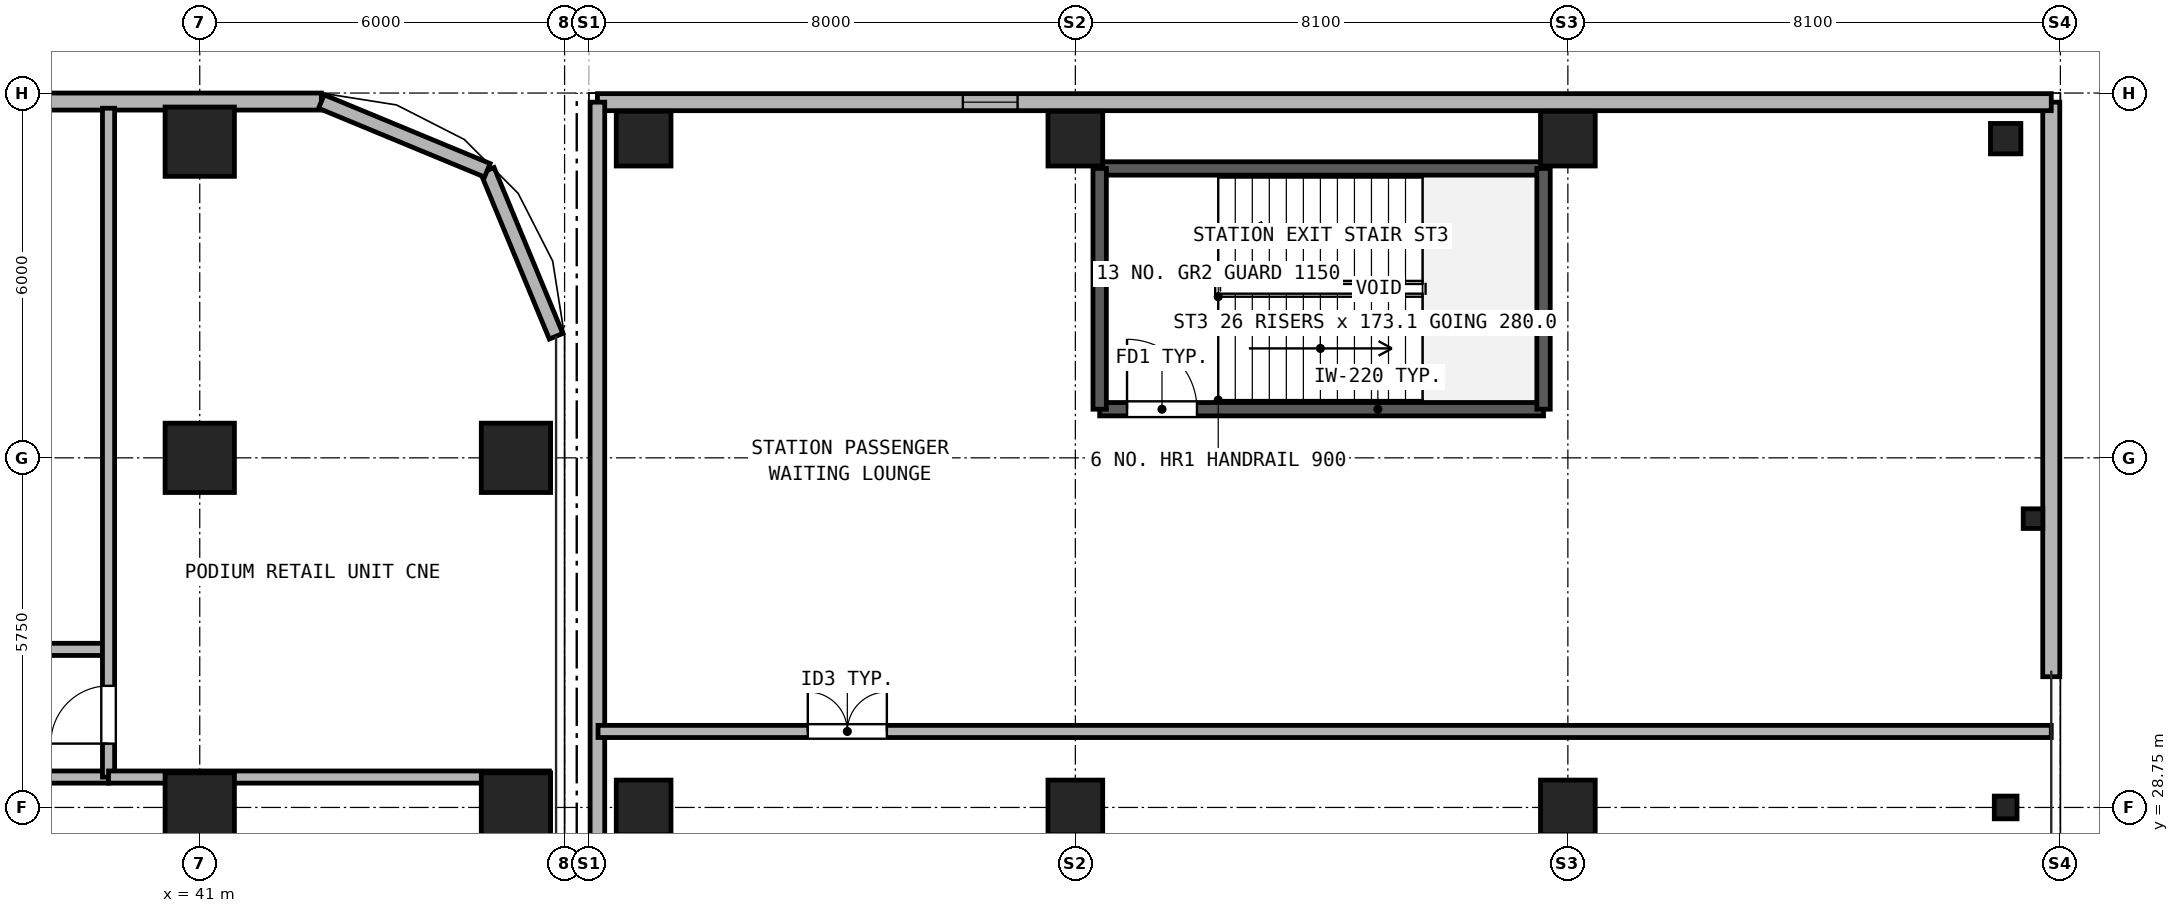
"""IFC4 building model, lengths in metres.
Left out: names, types, materials, properties, quantities, classifications, styles, units other than length and angle.
Written with IfcOpenShell. Run it as: python <this file> out.ifc"""

import sys

from ifc_helpers import new_model, si_unit, direction, frame, frame_2d, origin, origin_2d, place, context, subcontext, project, spatial, rectangle, hollow_rectangle, i_section, extrude, source, transform, mapped, element, fill, save


model = new_model("IFC4")
c1 = context("Model", 3, precision=1e-05, world=origin(), true_north=direction((0.0, 1.0)))
c2 = subcontext(c1, "Body", "Model", "MODEL_VIEW")
j1 = project(units=[si_unit("LENGTHUNIT", "METRE"), si_unit("PLANEANGLEUNIT", "RADIAN")], contexts=[c1])
p1 = place(None, origin())
s1 = spatial("IfcSite", under=j1, at=p1, CompositionType="ELEMENT")
p2 = place(p1, origin())
s2 = spatial("IfcBuilding", under=s1, at=p2, CompositionType="ELEMENT")
p3 = place(p2, frame((0.0, 0.0, 9.0)))
s3 = spatial("IfcBuildingStorey", under=s2, at=p3, CompositionType="ELEMENT", Elevation=9.0)
m1 = source(origin(), c2, "Body", "SweptSolid", [
    extrude(hollow_rectangle(XDim=1.14, YDim=1.14, WallThickness=0.07, at=origin_2d()), origin(), (0.0, 0.0, 1.0), 4.18),
])
for number, where, z_axis, x_axis in (
    (1, (41.0, 39.7, 0.0), (0.0, 0.0, 1.0), (1.0, 0.0, 0.0)),
    (2, (46.2, 28.75, 0.0), (0.0, 0.0, 1.0), (1.0, 0.0, 0.0)),
    (3, (46.2, 34.5, 0.0), (0.0, 0.0, 1.0), (1.0, 0.0, 0.0)),
    (4, (41.0, 28.75, 0.0), (0.0, 0.0, 1.0), (1.0, 0.0, 0.0)),
    (5, (41.0, 34.5, 0.0), (0.0, 0.0, 1.0), (1.0, 0.0, 0.0)),
):
    element("IfcColumn", number, at=place(p3, frame(where, z_axis=z_axis, x_axis=x_axis)), inside=s3, PredefinedType="COLUMN", context=c2, shape_type="MappedRepresentation", body=[
        mapped(m1, transform((0.0, 0.0, 0.0), x_axis=(1.0, 0.0, 0.0), y_axis=(0.0, 1.0, 0.0), z_axis=(0.0, 0.0, 1.0), scale=1.0)),
    ])
m2 = source(origin(), c2, "Body", "SweptSolid", [
    extrude(hollow_rectangle(XDim=0.7, YDim=0.9, WallThickness=0.04, at=origin_2d()), origin(), (0.0, 0.0, 1.0), 4.18),
])
for number, where, z_axis, x_axis in (
    (6, (48.3, 28.75, 0.0), (0.0, 0.0, 1.0), (1.0, 0.0, 0.0)),
    (7, (48.3, 39.75, 0.0), (0.0, 0.0, 1.0), (1.0, 0.0, 0.0)),
    (8, (55.4, 28.75, 0.0), (0.0, 0.0, 1.0), (1.0, 0.0, 0.0)),
    (9, (55.4, 39.75, 0.0), (0.0, 0.0, 1.0), (1.0, 0.0, 0.0)),
    (10, (63.5, 28.75, 0.0), (0.0, 0.0, 1.0), (1.0, 0.0, 0.0)),
    (11, (63.5, 39.75, 0.0), (0.0, 0.0, 1.0), (1.0, 0.0, 0.0)),
):
    element("IfcColumn", number, at=place(p3, frame(where, z_axis=z_axis, x_axis=x_axis)), inside=s3, PredefinedType="COLUMN", context=c2, shape_type="MappedRepresentation", body=[
        mapped(m2, transform((0.0, 0.0, 0.0), x_axis=(1.0, 0.0, 0.0), y_axis=(0.0, 1.0, 0.0), z_axis=(0.0, 0.0, 1.0), scale=1.0)),
    ])
m3 = source(origin(), c2, "Body", "SweptSolid", [
    extrude(i_section(OverallWidth=0.374, OverallDepth=0.372, WebThickness=0.016, FlangeThickness=0.026, at=origin_2d()), origin(), (0.0, 0.0, 1.0), 4.18),
])
p4 = place(p3, frame((70.7, 28.75, 0.0), z_axis=(0.0, 0.0, 1.0), x_axis=(1.0, 0.0, 0.0)))
e12 = element("IfcColumn", 12, at=p4, inside=s3, PredefinedType="COLUMN", context=c2, shape_type="MappedRepresentation", body=[
    mapped(m3, transform((0.0, 0.0, 0.0), x_axis=(1.0, 0.0, 0.0), y_axis=(0.0, 1.0, 0.0), z_axis=(0.0, 0.0, 1.0), scale=1.0)),
])
m4 = source(origin(), c2, "Body", "SweptSolid", [
    extrude(hollow_rectangle(XDim=0.5, YDim=0.5, WallThickness=0.025, at=origin_2d()), origin(), (0.0, 0.0, 1.0), 4.18),
])
p5 = place(p3, frame((70.7, 39.75, 0.0), z_axis=(0.0, 0.0, 1.0), x_axis=(1.0, 0.0, 0.0)))
e13 = element("IfcColumn", 13, at=p5, inside=s3, PredefinedType="COLUMN", context=c2, shape_type="MappedRepresentation", body=[
    mapped(m4, transform((0.0, 0.0, 0.0), x_axis=(1.0, 0.0, 0.0), y_axis=(0.0, 1.0, 0.0), z_axis=(0.0, 0.0, 1.0), scale=1.0)),
])
m5 = source(origin(), c2, "Body", "SweptSolid", [
    extrude(i_section(OverallWidth=0.309, OverallDepth=0.323, WebThickness=0.014, FlangeThickness=0.023, at=origin_2d()), origin(), (0.0, 0.0, 1.0), 4.18),
])
p6 = place(p3, frame((71.15, 33.5, 0.0), z_axis=(0.0, 0.0, 1.0), x_axis=(1.0, 0.0, 0.0)))
e14 = element("IfcColumn", 14, at=p6, inside=s3, PredefinedType="PILASTER", context=c2, shape_type="MappedRepresentation", body=[
    mapped(m5, transform((0.0, 0.0, 0.0), x_axis=(1.0, 0.0, 0.0), y_axis=(0.0, 1.0, 0.0), z_axis=(0.0, 0.0, 1.0), scale=1.0)),
])
p7 = place(p3, frame((4.0, 40.36, 0.0), z_axis=(0.0, 0.0, 1.0), x_axis=(1.0, 0.0, 0.0)))
e15 = element("IfcWall", 15, at=p7, inside=s3, PredefinedType="SOLIDWALL", context=c2, shape_type="SweptSolid", body=[
    extrude(rectangle(XDim=39.0, YDim=0.28, at=frame_2d((19.5, 0.0))), origin(), (0.0, 0.0, 1.0), 4.18),
])
p8 = place(p7, frame((4.0, 0.0, 0.9)))
e16 = element("IfcOpeningElement", 16, at=p8, cuts=e15, PredefinedType="OPENING", context=c2, shape_type="SweptSolid", body=[
    extrude(rectangle(XDim=1.5, YDim=1.8, at=frame_2d((0.75, 0.9))), frame((0.0, 0.15, 0.0), z_axis=(0.0, -1.0, 0.0), x_axis=(1.0, 0.0, 0.0)), (0.0, 0.0, 1.0), 0.3),
])
p9 = place(p7, frame((11.2, 0.0, 0.9)))
e17 = element("IfcOpeningElement", 17, at=p9, cuts=e15, PredefinedType="OPENING", context=c2, shape_type="SweptSolid", body=[
    extrude(rectangle(XDim=1.5, YDim=1.8, at=frame_2d((0.75, 0.9))), frame((0.0, 0.15, 0.0), z_axis=(0.0, -1.0, 0.0), x_axis=(1.0, 0.0, 0.0)), (0.0, 0.0, 1.0), 0.3),
])
p10 = place(p7, frame((19.5, 0.0, 0.9)))
e18 = element("IfcOpeningElement", 18, at=p10, cuts=e15, PredefinedType="OPENING", context=c2, shape_type="SweptSolid", body=[
    extrude(rectangle(XDim=1.5, YDim=1.8, at=frame_2d((0.75, 0.9))), frame((0.0, 0.15, 0.0), z_axis=(0.0, -1.0, 0.0), x_axis=(1.0, 0.0, 0.0)), (0.0, 0.0, 1.0), 0.3),
])
p11 = place(p7, frame((26.2, 0.0, 0.9)))
e19 = element("IfcOpeningElement", 19, at=p11, cuts=e15, PredefinedType="OPENING", context=c2, shape_type="SweptSolid", body=[
    extrude(rectangle(XDim=1.5, YDim=1.8, at=frame_2d((0.75, 0.9))), frame((0.0, 0.15, 0.0), z_axis=(0.0, -1.0, 0.0), x_axis=(1.0, 0.0, 0.0)), (0.0, 0.0, 1.0), 0.3),
])
p12 = place(p7, frame((32.8, 0.0, 0.9)))
e20 = element("IfcOpeningElement", 20, at=p12, cuts=e15, PredefinedType="OPENING", context=c2, shape_type="SweptSolid", body=[
    extrude(rectangle(XDim=1.5, YDim=1.8, at=frame_2d((0.75, 0.9))), frame((0.0, 0.15, 0.0), z_axis=(0.0, -1.0, 0.0), x_axis=(1.0, 0.0, 0.0)), (0.0, 0.0, 1.0), 0.3),
])
for number, where, z_axis, x_axis in (
    (21, (46.86, 36.5, 0.0), (0.0, 0.0, 1.0), (-0.383, 0.924, 0.0)),
    (22, (45.729, 39.229, 0.0), (0.0, 0.0, 1.0), (-0.924, 0.383, 0.0)),
):
    element("IfcWall", number, at=place(p3, frame(where, z_axis=z_axis, x_axis=x_axis)), inside=s3, PredefinedType="SOLIDWALL", context=c2, shape_type="SweptSolid", body=[
        extrude(rectangle(XDim=2.954, YDim=0.24, at=frame_2d((1.477, 0.0))), origin(), (0.0, 0.0, 1.0), 4.18),
    ])
p13 = place(p3, frame((71.45, 30.9, 0.0), z_axis=(0.0, 0.0, 1.0), x_axis=(0.0, 1.0, 0.0)))
e23 = element("IfcWall", 23, at=p13, inside=s3, PredefinedType="SOLIDWALL", context=c2, shape_type="SweptSolid", body=[
    extrude(rectangle(XDim=9.45, YDim=0.28, at=frame_2d((4.725, 0.0))), origin(), (0.0, 0.0, 1.0), 4.18),
])
p14 = place(p3, frame((47.54, 40.35, 0.0), z_axis=(0.0, 0.0, 1.0), x_axis=(1.0, 0.0, 0.0)))
e24 = element("IfcWall", 24, at=p14, inside=s3, PredefinedType="SOLIDWALL", context=c2, shape_type="SweptSolid", body=[
    extrude(rectangle(XDim=23.91, YDim=0.28, at=frame_2d((11.955, 0.0))), origin(), (0.0, 0.0, 1.0), 4.18),
])
p15 = place(p14, frame((6.01, 0.0, 1.1)))
e25 = element("IfcOpeningElement", 25, at=p15, cuts=e24, PredefinedType="OPENING", context=c2, shape_type="SweptSolid", body=[
    extrude(rectangle(XDim=0.9, YDim=1.5, at=frame_2d((0.45, 0.75))), frame((0.0, 0.15, 0.0), z_axis=(0.0, -1.0, 0.0), x_axis=(1.0, 0.0, 0.0)), (0.0, 0.0, 1.0), 0.3),
])
p16 = place(p3, frame((47.54, -0.54, 0.0), z_axis=(0.0, 0.0, 1.0), x_axis=(0.0, 1.0, 0.0)))
e26 = element("IfcWall", 26, at=p16, inside=s3, PredefinedType="SOLIDWALL", context=c2, shape_type="SweptSolid", body=[
    extrude(rectangle(XDim=40.89, YDim=0.24, at=frame_2d((20.445, 0.0))), origin(), (0.0, 0.0, 1.0), 4.18),
])
p17 = place(p3, frame((7.5, 31.35, 0.0), z_axis=(0.0, 0.0, 1.0), x_axis=(1.0, 0.0, 0.0)))
e27 = element("IfcWall", 27, at=p17, inside=s3, PredefinedType="PARTITIONING", context=c2, shape_type="SweptSolid", body=[
    extrude(rectangle(XDim=32.0, YDim=0.2, at=frame_2d((16.0, 0.0))), origin(), (0.0, 0.0, 1.0), 4.18),
])
p18 = place(p17, frame((8.5, 0.0, 0.0)))
e28 = element("IfcOpeningElement", 28, at=p18, cuts=e27, PredefinedType="OPENING", context=c2, shape_type="SweptSolid", body=[
    extrude(rectangle(XDim=0.95, YDim=2.15, at=frame_2d((0.475, 1.075))), frame((0.0, 0.11, 0.0), z_axis=(0.0, -1.0, 0.0), x_axis=(1.0, 0.0, 0.0)), (0.0, 0.0, 1.0), 0.22),
])
p19 = place(p17, frame((24.5, 0.0, 0.0)))
e29 = element("IfcOpeningElement", 29, at=p19, cuts=e27, PredefinedType="OPENING", context=c2, shape_type="SweptSolid", body=[
    extrude(rectangle(XDim=0.95, YDim=2.15, at=frame_2d((0.475, 1.075))), frame((0.0, 0.11, 0.0), z_axis=(0.0, -1.0, 0.0), x_axis=(1.0, 0.0, 0.0)), (0.0, 0.0, 1.0), 0.22),
])
p20 = place(p3, frame((30.7, 29.25, 0.0), z_axis=(0.0, 0.0, 1.0), x_axis=(1.0, 0.0, 0.0)))
e30 = element("IfcWall", 30, at=p20, inside=s3, PredefinedType="PARTITIONING", context=c2, shape_type="SweptSolid", body=[
    extrude(rectangle(XDim=8.8, YDim=0.2, at=frame_2d((4.4, 0.0))), origin(), (0.0, 0.0, 1.0), 4.18),
])
p21 = place(p3, frame((39.5, 29.25, 0.0), z_axis=(0.0, 0.0, 1.0), x_axis=(0.0, 1.0, 0.0)))
e31 = element("IfcWall", 31, at=p21, inside=s3, PredefinedType="PARTITIONING", context=c2, shape_type="SweptSolid", body=[
    extrude(rectangle(XDim=11.0, YDim=0.2, at=frame_2d((5.5, 0.0))), origin(), (0.0, 0.0, 1.0), 4.18),
])
p22 = place(p21, frame((0.55, 0.0, 0.0)))
e32 = element("IfcOpeningElement", 32, at=p22, cuts=e31, PredefinedType="OPENING", context=c2, shape_type="SweptSolid", body=[
    extrude(rectangle(XDim=0.95, YDim=2.15, at=frame_2d((0.475, 1.075))), frame((0.0, 0.11, 0.0), z_axis=(0.0, -1.0, 0.0), x_axis=(1.0, 0.0, 0.0)), (0.0, 0.0, 1.0), 0.22),
])
p23 = place(p3, frame((39.5, 29.25, 0.0), z_axis=(0.0, 0.0, 1.0), x_axis=(1.0, 0.0, 0.0)))
e33 = element("IfcWall", 33, at=p23, inside=s3, PredefinedType="PARTITIONING", context=c2, shape_type="SweptSolid", body=[
    extrude(rectangle(XDim=7.25, YDim=0.2, at=frame_2d((3.625, 0.0))), origin(), (0.0, 0.0, 1.0), 4.18),
])
p24 = place(p3, frame((55.8, 35.3, 0.0), z_axis=(0.0, 0.0, 1.0), x_axis=(1.0, 0.0, 0.0)))
e34 = element("IfcWall", 34, at=p24, inside=s3, PredefinedType="SOLIDWALL", context=c2, shape_type="SweptSolid", body=[
    extrude(rectangle(XDim=7.3, YDim=0.22, at=frame_2d((3.65, 0.0))), origin(), (0.0, 0.0, 1.0), 4.18),
])
p25 = place(p24, frame((0.45, 0.0, 0.0)))
e35 = element("IfcOpeningElement", 35, at=p25, cuts=e34, PredefinedType="OPENING", context=c2, shape_type="SweptSolid", body=[
    extrude(rectangle(XDim=1.15, YDim=2.2, at=frame_2d((0.575, 1.1))), frame((0.0, 0.12, 0.0), z_axis=(0.0, -1.0, 0.0), x_axis=(1.0, 0.0, 0.0)), (0.0, 0.0, 1.0), 0.24),
])
p26 = place(p3, frame((55.8, 39.26, 0.0), z_axis=(0.0, 0.0, 1.0), x_axis=(1.0, 0.0, 0.0)))
e36 = element("IfcWall", 36, at=p26, inside=s3, PredefinedType="SOLIDWALL", context=c2, shape_type="SweptSolid", body=[
    extrude(rectangle(XDim=7.3, YDim=0.22, at=frame_2d((3.65, 0.0))), origin(), (0.0, 0.0, 1.0), 4.18),
])
for number, where, z_axis, x_axis in (
    (37, (55.8, 35.3, 0.0), (0.0, 0.0, 1.0), (0.0, 1.0, 0.0)),
    (38, (63.1, 35.3, 0.0), (0.0, 0.0, 1.0), (0.0, 1.0, 0.0)),
):
    element("IfcWall", number, at=place(p3, frame(where, z_axis=z_axis, x_axis=x_axis)), inside=s3, PredefinedType="SOLIDWALL", context=c2, shape_type="SweptSolid", body=[
        extrude(rectangle(XDim=3.96, YDim=0.22, at=frame_2d((1.98, 0.0))), origin(), (0.0, 0.0, 1.0), 4.18),
    ])
p27 = place(p3, frame((47.55, 30.0, 0.0), z_axis=(0.0, 0.0, 1.0), x_axis=(1.0, 0.0, 0.0)))
e39 = element("IfcWall", 39, at=p27, inside=s3, PredefinedType="PARTITIONING", context=c2, shape_type="SweptSolid", body=[
    extrude(rectangle(XDim=23.9, YDim=0.2, at=frame_2d((11.95, 0.0))), origin(), (0.0, 0.0, 1.0), 4.18),
])
p28 = place(p27, frame((3.45, 0.0, 0.0)))
e40 = element("IfcOpeningElement", 40, at=p28, cuts=e39, PredefinedType="OPENING", context=c2, shape_type="SweptSolid", body=[
    extrude(rectangle(XDim=1.3, YDim=2.2, at=frame_2d((0.65, 1.1))), frame((0.0, 0.11, 0.0), z_axis=(0.0, -1.0, 0.0), x_axis=(1.0, 0.0, 0.0)), (0.0, 0.0, 1.0), 0.22),
])
p29 = place(p15, origin())
e41 = element("IfcWindow", 41, at=p29, inside=s3, PartitioningType="SINGLE_PANEL", PredefinedType="WINDOW", context=c2, shape_type="SweptSolid", body=[
    extrude(rectangle(XDim=0.9, YDim=1.5, at=frame_2d((0.45, 0.75))), frame((0.0, 0.03, 0.0), z_axis=(0.0, -1.0, 0.0), x_axis=(1.0, 0.0, 0.0)), (0.0, 0.0, 1.0), 0.06),
])
fill(e25, e41)
p30 = place(p22, origin())
e42 = element("IfcDoor", 42, at=p30, inside=s3, OperationType="SINGLE_SWING_LEFT", PredefinedType="DOOR", context=c2, shape_type="SweptSolid", body=[
    extrude(rectangle(XDim=0.95, YDim=2.15, at=frame_2d((0.475, 1.075))), frame((0.0, 0.025, 0.0), z_axis=(0.0, -1.0, 0.0), x_axis=(1.0, 0.0, 0.0)), (0.0, 0.0, 1.0), 0.05),
])
fill(e32, e42)
p31 = place(p25, frame((1.15, 0.0, 0.0), z_axis=(0.0, 0.0, 1.0), x_axis=(-1.0, 0.0, 0.0)))
e43 = element("IfcDoor", 43, at=p31, inside=s3, OperationType="SINGLE_SWING_LEFT", PredefinedType="DOOR", context=c2, shape_type="SweptSolid", body=[
    extrude(rectangle(XDim=1.15, YDim=2.2, at=frame_2d((0.575, 1.1))), frame((0.0, 0.025, 0.0), z_axis=(0.0, -1.0, 0.0), x_axis=(1.0, 0.0, 0.0)), (0.0, 0.0, 1.0), 0.05),
])
fill(e35, e43)
p32 = place(p28, origin())
e44 = element("IfcDoor", 44, at=p32, inside=s3, OperationType="DOUBLE_DOOR_SINGLE_SWING", PredefinedType="DOOR", context=c2, shape_type="SweptSolid", body=[
    extrude(rectangle(XDim=1.3, YDim=2.2, at=frame_2d((0.65, 1.1))), frame((0.0, 0.025, 0.0), z_axis=(0.0, -1.0, 0.0), x_axis=(1.0, 0.0, 0.0)), (0.0, 0.0, 1.0), 0.05),
])
fill(e40, e44)
save(model, sys.argv[1])
